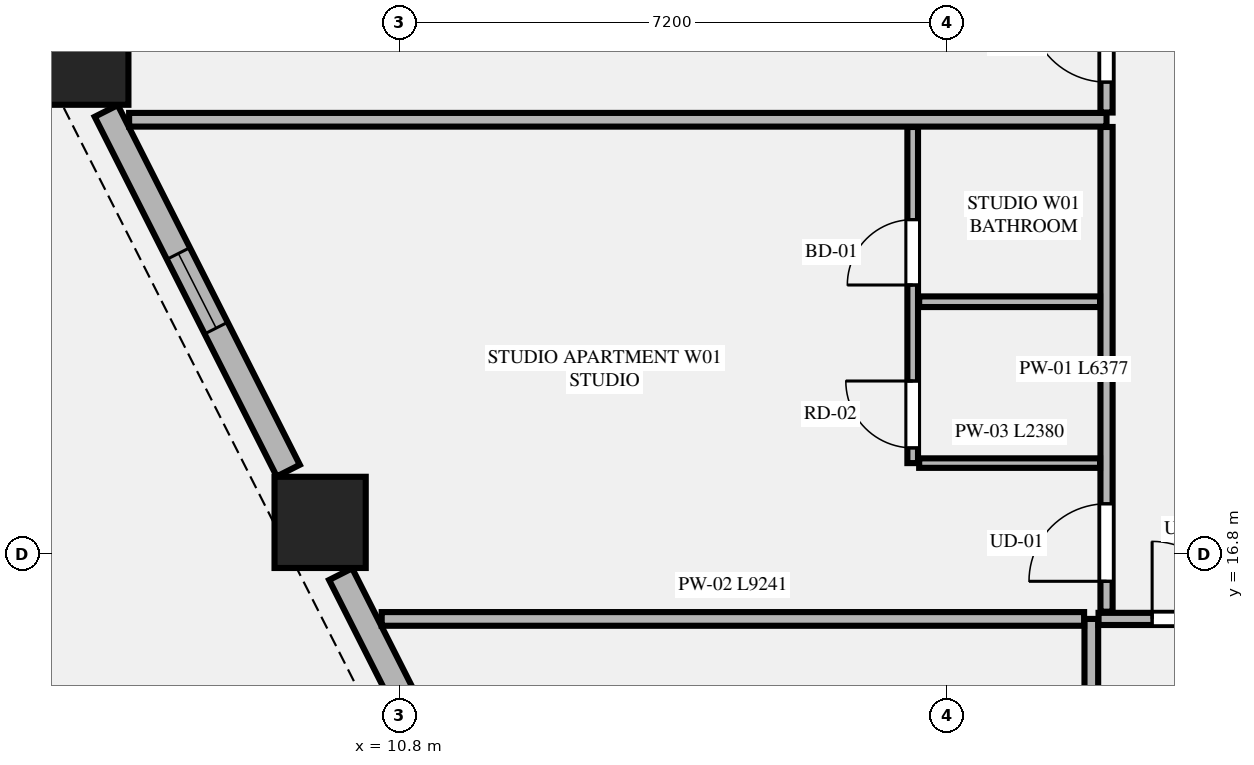
"""IFC4 building model, lengths in metres.
Left out: names, types, materials, properties, quantities, classifications, styles, units other than length and angle.
Written with IfcOpenShell. Run it as: python <this file> out.ifc"""

import sys

from ifc_helpers import new_model, si_unit, direction, frame, frame_2d, origin, origin_2d, place, context, subcontext, project, spatial, rectangle, extrude, element, fill, save


model = new_model("IFC4")
c1 = context("Model", 3, precision=1e-05, world=origin(), true_north=direction((0.0, 1.0)))
c2 = subcontext(c1, "Body", "Model", "MODEL_VIEW")
j1 = project(units=[si_unit("LENGTHUNIT", "METRE"), si_unit("PLANEANGLEUNIT", "RADIAN")], contexts=[c1])
p1 = place(None, origin())
s1 = spatial("IfcSite", under=j1, at=p1, CompositionType="ELEMENT")
p2 = place(p1, origin())
s2 = spatial("IfcBuilding", under=s1, at=p2, CompositionType="ELEMENT")
p3 = place(p2, frame((0.0, 0.0, 24.9)))
s3 = spatial("IfcBuildingStorey", under=s2, at=p3, CompositionType="ELEMENT", Elevation=24.9)
for number, where, z_axis, x_axis in (
    (1, (6.632, 23.314, 0.0), (0.0, 0.0, 1.0), (1.0, 0.0, 0.0)),
    (2, (9.754, 17.22, 0.0), (0.0, 0.0, 1.0), (1.0, 0.0, 0.0)),
):
    element("IfcColumn", number, at=place(p3, frame(where, z_axis=z_axis, x_axis=x_axis)), inside=s3, PredefinedType="COLUMN", context=c2, shape_type="SweptSolid", body=[
        extrude(rectangle(XDim=1.2, YDim=1.2, at=origin_2d()), origin(), (0.0, 0.0, 1.0), 3.55),
    ])
p4 = place(p3, frame((6.94, 22.633, 0.0), z_axis=(0.0, 0.0, 1.0), x_axis=(0.451572088722, -0.892234637686, 0.0)))
e3 = element("IfcWall", 3, at=p4, inside=s3, PredefinedType="STANDARD", context=c2, shape_type="SweptSolid", body=[
    extrude(rectangle(XDim=5.304, YDim=0.34, at=frame_2d((2.652, 0.0))), origin(), (0.0, 0.0, 1.0), 2.787),
])
p5 = place(p4, frame((2.102, 0.0, 0.75)))
e4 = element("IfcOpeningElement", 4, at=p5, cuts=e3, PredefinedType="OPENING", context=c2, shape_type="SweptSolid", body=[
    extrude(rectangle(XDim=1.1, YDim=1.887, at=frame_2d((0.55, 0.943))), frame((0.0, 0.18, 0.0), z_axis=(0.0, -1.0, 0.0), x_axis=(1.0, 0.0, 0.0)), (0.0, 0.0, 1.0), 0.36),
])
p6 = place(p3, frame((10.024, 16.539, 0.0), z_axis=(0.0, 0.0, 1.0), x_axis=(0.451627137896, -0.892206774417, 0.0)))
e5 = element("IfcWall", 5, at=p6, inside=s3, PredefinedType="STANDARD", context=c2, shape_type="SweptSolid", body=[
    extrude(rectangle(XDim=5.547, YDim=0.34, at=frame_2d((2.773, 0.0))), origin(), (0.0, 0.0, 1.0), 2.787),
])
p7 = place(p6, frame((2.479, 0.0, 0.0)))
e6 = element("IfcOpeningElement", 6, at=p7, cuts=e5, PredefinedType="OPENING", context=c2, shape_type="SweptSolid", body=[
    extrude(rectangle(XDim=1.5, YDim=2.3, at=frame_2d((0.75, 1.15))), frame((0.0, 0.18, 0.0), z_axis=(0.0, -1.0, 0.0), x_axis=(1.0, 0.0, 0.0)), (0.0, 0.0, 1.0), 0.36),
])
p8 = place(p3, frame((19.9, 2.455, 0.0), z_axis=(0.0, 0.0, 1.0), x_axis=(0.0, 1.0, 0.0)))
e7 = element("IfcWall", 7, at=p8, inside=s3, PredefinedType="PARTITIONING", context=c2, shape_type="SweptSolid", body=[
    extrude(rectangle(XDim=13.495, YDim=0.18, at=frame_2d((6.748, 0.0))), origin(), (0.0, 0.0, 1.0), 3.33),
])
p9 = place(p3, frame((19.995, 15.95, 0.0), z_axis=(0.0, 0.0, 1.0), x_axis=(1.0, 0.0, 0.0)))
e8 = element("IfcWall", 8, at=p9, inside=s3, PredefinedType="PARTITIONING", context=c2, shape_type="SweptSolid", body=[
    extrude(rectangle(XDim=8.188, YDim=0.16, at=frame_2d((4.094, 0.0))), origin(), (0.0, 0.0, 1.0), 3.33),
])
p10 = place(p9, frame((0.705, 0.0, 0.0)))
e9 = element("IfcOpeningElement", 9, at=p10, cuts=e8, PredefinedType="OPENING", context=c2, shape_type="SweptSolid", body=[
    extrude(rectangle(XDim=1.02, YDim=2.25, at=frame_2d((0.51, 1.125))), frame((0.0, 0.09, 0.0), z_axis=(0.0, -1.0, 0.0), x_axis=(1.0, 0.0, 0.0)), (0.0, 0.0, 1.0), 0.18),
])
p11 = place(p3, frame((10.564, 15.95, 0.0), z_axis=(0.0, 0.0, 1.0), x_axis=(1.0, 0.0, 0.0)))
e10 = element("IfcWall", 10, at=p11, inside=s3, PredefinedType="PARTITIONING", context=c2, shape_type="SweptSolid", body=[
    extrude(rectangle(XDim=9.241, YDim=0.18, at=frame_2d((4.621, 0.0))), origin(), (0.0, 0.0, 1.0), 3.33),
])
p12 = place(p3, frame((20.1, 16.045, 0.0), z_axis=(0.0, 0.0, 1.0), x_axis=(0.0, 1.0, 0.0)))
e11 = element("IfcWall", 11, at=p12, inside=s3, PredefinedType="PARTITIONING", context=c2, shape_type="SweptSolid", body=[
    extrude(rectangle(XDim=6.377, YDim=0.16, at=frame_2d((3.188, 0.0))), origin(), (0.0, 0.0, 1.0), 3.33),
])
p13 = place(p12, frame((0.4, 0.0, 0.0)))
e12 = element("IfcOpeningElement", 12, at=p13, cuts=e11, PredefinedType="OPENING", context=c2, shape_type="SweptSolid", body=[
    extrude(rectangle(XDim=1.02, YDim=2.25, at=frame_2d((0.51, 1.125))), frame((0.0, 0.09, 0.0), z_axis=(0.0, -1.0, 0.0), x_axis=(1.0, 0.0, 0.0)), (0.0, 0.0, 1.0), 0.18),
])
p14 = place(p3, frame((17.635, 18.0, 0.0), z_axis=(0.0, 0.0, 1.0), x_axis=(1.0, 0.0, 0.0)))
e13 = element("IfcWall", 13, at=p14, inside=s3, PredefinedType="PARTITIONING", context=c2, shape_type="SweptSolid", body=[
    extrude(rectangle(XDim=2.38, YDim=0.125, at=frame_2d((1.19, 0.0))), origin(), (0.0, 0.0, 1.0), 2.637),
])
p15 = place(p3, frame((17.55, 18.0, 0.0), z_axis=(0.0, 0.0, 1.0), x_axis=(0.0, 1.0, 0.0)))
e14 = element("IfcWall", 14, at=p15, inside=s3, PredefinedType="PLUMBINGWALL", context=c2, shape_type="SweptSolid", body=[
    extrude(rectangle(XDim=4.422, YDim=0.14, at=frame_2d((2.211, 0.0))), origin(), (0.0, 0.0, 1.0), 3.33),
])
p16 = place(p15, frame((2.343, 0.0, 0.0)))
e15 = element("IfcOpeningElement", 15, at=p16, cuts=e14, PredefinedType="OPENING", context=c2, shape_type="SweptSolid", body=[
    extrude(rectangle(XDim=0.86, YDim=2.1, at=frame_2d((0.43, 1.05))), frame((0.0, 0.08, 0.0), z_axis=(0.0, -1.0, 0.0), x_axis=(1.0, 0.0, 0.0)), (0.0, 0.0, 1.0), 0.16),
])
p17 = place(p15, frame((0.2, 0.0, 0.0)))
e16 = element("IfcOpeningElement", 16, at=p17, cuts=e14, PredefinedType="OPENING", context=c2, shape_type="SweptSolid", body=[
    extrude(rectangle(XDim=0.88, YDim=2.15, at=frame_2d((0.44, 1.075))), frame((0.0, 0.08, 0.0), z_axis=(0.0, -1.0, 0.0), x_axis=(1.0, 0.0, 0.0)), (0.0, 0.0, 1.0), 0.16),
])
p18 = place(p3, frame((17.635, 20.123, 0.0), z_axis=(0.0, 0.0, 1.0), x_axis=(1.0, 0.0, 0.0)))
e17 = element("IfcWall", 17, at=p18, inside=s3, PredefinedType="PLUMBINGWALL", context=c2, shape_type="SweptSolid", body=[
    extrude(rectangle(XDim=2.38, YDim=0.14, at=frame_2d((1.19, 0.0))), origin(), (0.0, 0.0, 1.0), 3.33),
])
p19 = place(p3, frame((7.241, 22.517, 0.0), z_axis=(0.0, 0.0, 1.0), x_axis=(1.0, 0.0, 0.0)))
e18 = element("IfcWall", 18, at=p19, inside=s3, PredefinedType="PARTITIONING", context=c2, shape_type="SweptSolid", body=[
    extrude(rectangle(XDim=12.859, YDim=0.18, at=frame_2d((6.43, 0.0))), origin(), (0.0, 0.0, 1.0), 3.33),
])
p20 = place(p3, frame((20.1, 22.612, 0.0), z_axis=(0.0, 0.0, 1.0), x_axis=(0.0, 1.0, 0.0)))
e19 = element("IfcWall", 19, at=p20, inside=s3, PredefinedType="PARTITIONING", context=c2, shape_type="SweptSolid", body=[
    extrude(rectangle(XDim=6.377, YDim=0.16, at=frame_2d((3.188, 0.0))), origin(), (0.0, 0.0, 1.0), 3.33),
])
p21 = place(p20, frame((0.4, 0.0, 0.0)))
e20 = element("IfcOpeningElement", 20, at=p21, cuts=e19, PredefinedType="OPENING", context=c2, shape_type="SweptSolid", body=[
    extrude(rectangle(XDim=1.02, YDim=2.25, at=frame_2d((0.51, 1.125))), frame((0.0, 0.09, 0.0), z_axis=(0.0, -1.0, 0.0), x_axis=(1.0, 0.0, 0.0)), (0.0, 0.0, 1.0), 0.18),
])
p22 = place(p5, origin())
e21 = element("IfcWindow", 21, at=p22, inside=s3, PartitioningType="SINGLE_PANEL", PredefinedType="WINDOW", context=c2, shape_type="SweptSolid", body=[
    extrude(rectangle(XDim=1.1, YDim=1.887, at=frame_2d((0.55, 0.943))), frame((0.0, 0.03, 0.0), z_axis=(0.0, -1.0, 0.0), x_axis=(1.0, 0.0, 0.0)), (0.0, 0.0, 1.0), 0.06),
])
fill(e4, e21)
p23 = place(p10, origin())
e22 = element("IfcDoor", 22, at=p23, inside=s3, OperationType="SINGLE_SWING_LEFT", PredefinedType="DOOR", context=c2, shape_type="SweptSolid", body=[
    extrude(rectangle(XDim=1.02, YDim=2.25, at=frame_2d((0.51, 1.125))), frame((0.0, 0.025, 0.0), z_axis=(0.0, -1.0, 0.0), x_axis=(1.0, 0.0, 0.0)), (0.0, 0.0, 1.0), 0.05),
])
fill(e9, e22)
p24 = place(p16, origin())
e23 = element("IfcDoor", 23, at=p24, inside=s3, OperationType="SINGLE_SWING_LEFT", PredefinedType="DOOR", context=c2, shape_type="SweptSolid", body=[
    extrude(rectangle(XDim=0.86, YDim=2.1, at=frame_2d((0.43, 1.05))), frame((0.0, 0.025, 0.0), z_axis=(0.0, -1.0, 0.0), x_axis=(1.0, 0.0, 0.0)), (0.0, 0.0, 1.0), 0.05),
])
fill(e15, e23)
p25 = place(p13, origin())
e24 = element("IfcDoor", 24, at=p25, inside=s3, OperationType="SINGLE_SWING_LEFT", PredefinedType="DOOR", context=c2, shape_type="SweptSolid", body=[
    extrude(rectangle(XDim=1.02, YDim=2.25, at=frame_2d((0.51, 1.125))), frame((0.0, 0.025, 0.0), z_axis=(0.0, -1.0, 0.0), x_axis=(1.0, 0.0, 0.0)), (0.0, 0.0, 1.0), 0.05),
])
fill(e12, e24)
p26 = place(p17, origin())
e25 = element("IfcDoor", 25, at=p26, inside=s3, OperationType="SINGLE_SWING_RIGHT", PredefinedType="DOOR", context=c2, shape_type="SweptSolid", body=[
    extrude(rectangle(XDim=0.88, YDim=2.15, at=frame_2d((0.44, 1.075))), frame((0.0, 0.025, 0.0), z_axis=(0.0, -1.0, 0.0), x_axis=(1.0, 0.0, 0.0)), (0.0, 0.0, 1.0), 0.05),
])
fill(e16, e25)
p27 = place(p21, origin())
e26 = element("IfcDoor", 26, at=p27, inside=s3, OperationType="SINGLE_SWING_RIGHT", PredefinedType="DOOR", context=c2, shape_type="SweptSolid", body=[
    extrude(rectangle(XDim=1.02, YDim=2.25, at=frame_2d((0.51, 1.125))), frame((0.0, 0.025, 0.0), z_axis=(0.0, -1.0, 0.0), x_axis=(1.0, 0.0, 0.0)), (0.0, 0.0, 1.0), 0.05),
])
fill(e20, e26)
save(model, sys.argv[1])
